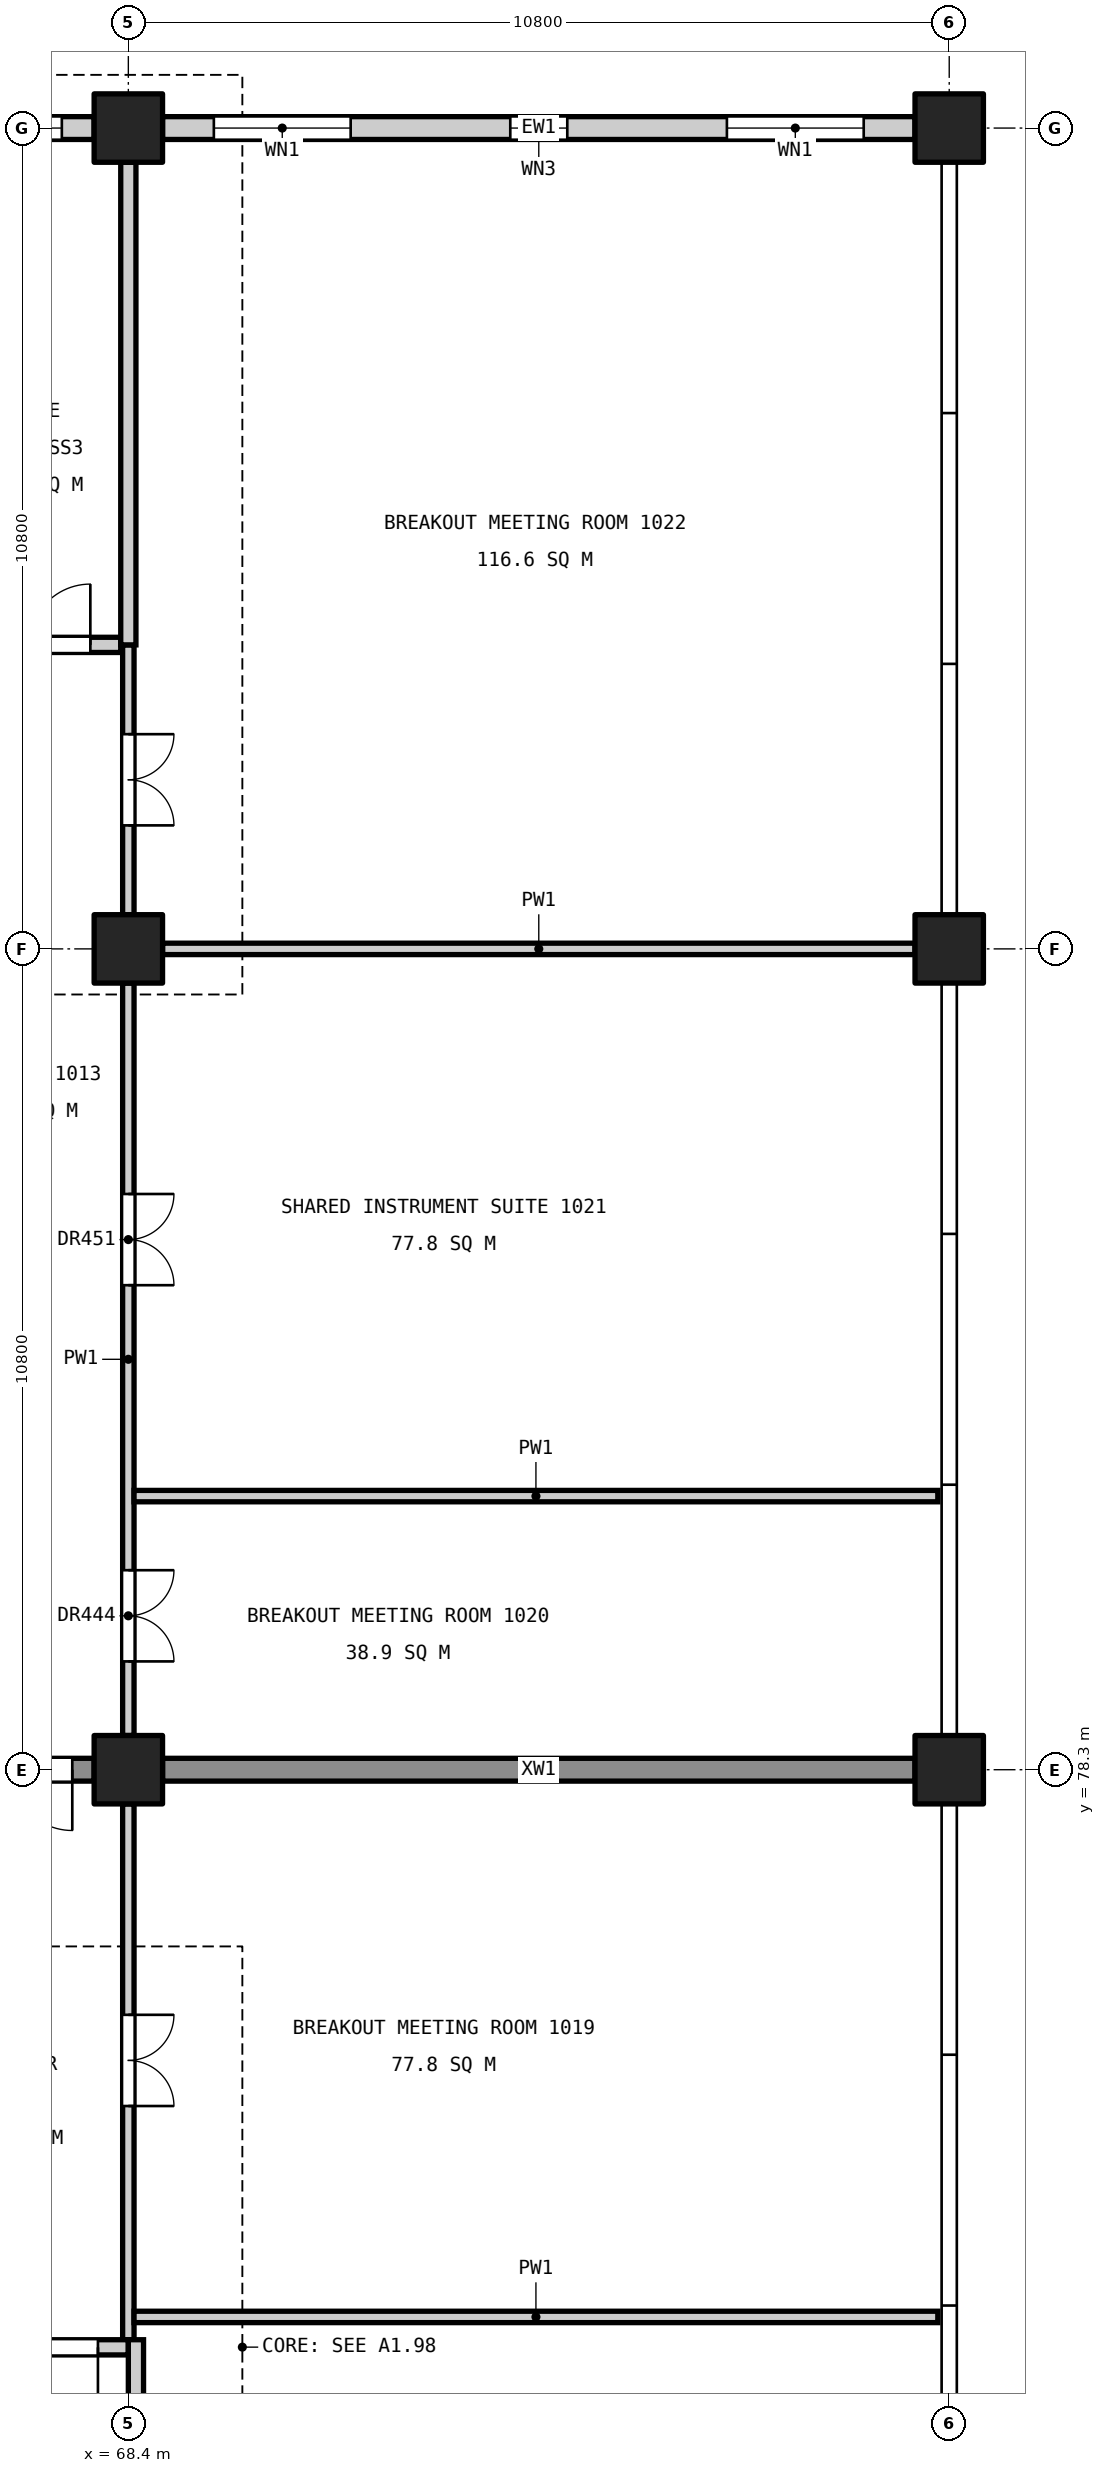
"""IFC4 building model, lengths in metres.
Left out: names, types, materials, properties, quantities, classifications, styles, units other than length and angle.
Written with IfcOpenShell. Run it as: python <this file> out.ifc"""

import sys

from ifc_helpers import new_model, si_unit, direction, frame, frame_2d, origin, origin_2d, place, context, subcontext, project, spatial, rectangle, extrude, element, fill, save


model = new_model("IFC4")
c1 = context("Model", 3, precision=1e-05, world=origin(), true_north=direction((0.0, 1.0)))
c2 = subcontext(c1, "Body", "Model", "MODEL_VIEW")
j1 = project(units=[si_unit("LENGTHUNIT", "METRE"), si_unit("PLANEANGLEUNIT", "RADIAN")], contexts=[c1])
p1 = place(None, origin())
s1 = spatial("IfcSite", under=j1, at=p1, CompositionType="ELEMENT")
p2 = place(p1, origin())
s2 = spatial("IfcBuilding", under=s1, at=p2, CompositionType="ELEMENT")
p3 = place(p2, frame((0.0, 0.0, 51.0)))
s3 = spatial("IfcBuildingStorey", under=s2, at=p3, CompositionType="ELEMENT", Elevation=51.0)
for number, where, z_axis, x_axis in (
    (1, (68.4, 78.3, 0.0), (0.0, 0.0, 1.0), (1.0, 0.0, 0.0)),
    (2, (68.4, 89.1, 0.0), (0.0, 0.0, 1.0), (1.0, 0.0, 0.0)),
    (3, (68.4, 99.9, 0.0), (0.0, 0.0, 1.0), (1.0, 0.0, 0.0)),
    (4, (79.2, 78.3, 0.0), (0.0, 0.0, 1.0), (1.0, 0.0, 0.0)),
    (5, (79.2, 89.1, 0.0), (0.0, 0.0, 1.0), (1.0, 0.0, 0.0)),
    (6, (79.2, 99.9, 0.0), (0.0, 0.0, 1.0), (1.0, 0.0, 0.0)),
):
    element("IfcColumn", number, at=place(p3, frame(where, z_axis=z_axis, x_axis=x_axis)), inside=s3, PredefinedType="COLUMN", context=c2, shape_type="SweptSolid", body=[
        extrude(rectangle(XDim=0.9, YDim=0.9, at=origin_2d()), origin(), (0.0, 0.0, 1.0), 4.8),
    ])
p4 = place(p3, frame((61.65, 78.3, 0.0), z_axis=(0.0, 0.0, 1.0), x_axis=(1.0, 0.0, 0.0)))
e7 = element("IfcWall", 7, at=p4, inside=s3, PredefinedType="SHEAR", context=c2, shape_type="SweptSolid", body=[
    extrude(rectangle(XDim=6.3, YDim=0.3, at=frame_2d((3.15, 0.0))), origin(), (0.0, 0.0, 1.0), 4.55),
])
p5 = place(p4, frame((4.413, 0.0, 0.0)))
e8 = element("IfcOpeningElement", 8, at=p5, cuts=e7, PredefinedType="OPENING", context=c2, shape_type="SweptSolid", body=[
    extrude(rectangle(XDim=1.6, YDim=2.1, at=frame_2d((0.8, 1.05))), frame((0.0, 0.16, 0.0), z_axis=(0.0, -1.0, 0.0), x_axis=(1.0, 0.0, 0.0)), (0.0, 0.0, 1.0), 0.32),
])
p6 = place(p3, frame((68.85, 78.3, 0.0), z_axis=(0.0, 0.0, 1.0), x_axis=(1.0, 0.0, 0.0)))
e9 = element("IfcWall", 9, at=p6, inside=s3, PredefinedType="SHEAR", context=c2, shape_type="SweptSolid", body=[
    extrude(rectangle(XDim=9.9, YDim=0.3, at=frame_2d((4.95, 0.0))), origin(), (0.0, 0.0, 1.0), 4.55),
])
p7 = place(p3, frame((65.9, 99.9, 0.0), z_axis=(0.0, 0.0, 1.0), x_axis=(1.0, 0.0, 0.0)))
e10 = element("IfcWall", 10, at=p7, inside=s3, PredefinedType="STANDARD", context=c2, shape_type="SweptSolid", body=[
    extrude(rectangle(XDim=2.05, YDim=0.3, at=frame_2d((1.025, 0.0))), origin(), (0.0, 0.0, 1.0), 3.85),
])
p8 = place(p7, frame((0.425, 0.0, 0.9)))
e11 = element("IfcOpeningElement", 11, at=p8, cuts=e10, PredefinedType="OPENING", context=c2, shape_type="SweptSolid", body=[
    extrude(rectangle(XDim=1.2, YDim=2.4, at=frame_2d((0.6, 1.2))), frame((0.0, 0.16, 0.0), z_axis=(0.0, -1.0, 0.0), x_axis=(1.0, 0.0, 0.0)), (0.0, 0.0, 1.0), 0.32),
])
p9 = place(p3, frame((68.85, 99.9, 0.0), z_axis=(0.0, 0.0, 1.0), x_axis=(1.0, 0.0, 0.0)))
e12 = element("IfcWall", 12, at=p9, inside=s3, PredefinedType="STANDARD", context=c2, shape_type="SweptSolid", body=[
    extrude(rectangle(XDim=9.9, YDim=0.3, at=frame_2d((4.95, 0.0))), origin(), (0.0, 0.0, 1.0), 3.85),
])
p10 = place(p9, frame((0.675, 0.0, 0.9)))
e13 = element("IfcOpeningElement", 13, at=p10, cuts=e12, PredefinedType="OPENING", context=c2, shape_type="SweptSolid", body=[
    extrude(rectangle(XDim=1.8, YDim=2.4, at=frame_2d((0.9, 1.2))), frame((0.0, 0.16, 0.0), z_axis=(0.0, -1.0, 0.0), x_axis=(1.0, 0.0, 0.0)), (0.0, 0.0, 1.0), 0.32),
])
p11 = place(p9, frame((4.575, 0.0, 0.8)))
e14 = element("IfcOpeningElement", 14, at=p11, cuts=e12, PredefinedType="OPENING", context=c2, shape_type="SweptSolid", body=[
    extrude(rectangle(XDim=0.75, YDim=1.2, at=frame_2d((0.375, 0.6))), frame((0.0, 0.16, 0.0), z_axis=(0.0, -1.0, 0.0), x_axis=(1.0, 0.0, 0.0)), (0.0, 0.0, 1.0), 0.32),
])
p12 = place(p9, frame((7.425, 0.0, 0.9)))
e15 = element("IfcOpeningElement", 15, at=p12, cuts=e12, PredefinedType="OPENING", context=c2, shape_type="SweptSolid", body=[
    extrude(rectangle(XDim=1.8, YDim=2.4, at=frame_2d((0.9, 1.2))), frame((0.0, 0.16, 0.0), z_axis=(0.0, -1.0, 0.0), x_axis=(1.0, 0.0, 0.0)), (0.0, 0.0, 1.0), 0.32),
])
p13 = place(p3, frame((65.9, 93.1, 0.0), z_axis=(0.0, 0.0, 1.0), x_axis=(1.0, 0.0, 0.0)))
e16 = element("IfcWall", 16, at=p13, inside=s3, PredefinedType="PARTITIONING", context=c2, shape_type="SweptSolid", body=[
    extrude(rectangle(XDim=2.4, YDim=0.2, at=frame_2d((1.2, 0.0))), origin(), (0.0, 0.0, 1.0), 3.55),
])
p14 = place(p13, frame((0.4, 0.0, 0.0)))
e17 = element("IfcOpeningElement", 17, at=p14, cuts=e16, PredefinedType="OPENING", context=c2, shape_type="SweptSolid", body=[
    extrude(rectangle(XDim=1.6, YDim=2.1, at=frame_2d((0.8, 1.05))), frame((0.0, 0.11, 0.0), z_axis=(0.0, -1.0, 0.0), x_axis=(1.0, 0.0, 0.0)), (0.0, 0.0, 1.0), 0.22),
])
p15 = place(p3, frame((68.4, 70.8, 0.0), z_axis=(0.0, 0.0, 1.0), x_axis=(0.0, 1.0, 0.0)))
e18 = element("IfcWall", 18, at=p15, inside=s3, PredefinedType="PARTITIONING", context=c2, shape_type="SweptSolid", body=[
    extrude(rectangle(XDim=7.05, YDim=0.15, at=frame_2d((3.525, 0.0))), origin(), (0.0, 0.0, 1.0), 3.55),
])
p16 = place(p15, frame((3.075, 0.0, 0.0)))
e19 = element("IfcOpeningElement", 19, at=p16, cuts=e18, PredefinedType="OPENING", context=c2, shape_type="SweptSolid", body=[
    extrude(rectangle(XDim=1.2, YDim=2.1, at=frame_2d((0.6, 1.05))), frame((0.0, 0.085, 0.0), z_axis=(0.0, -1.0, 0.0), x_axis=(1.0, 0.0, 0.0)), (0.0, 0.0, 1.0), 0.17),
])
p17 = place(p3, frame((68.4, 78.75, 0.0), z_axis=(0.0, 0.0, 1.0), x_axis=(0.0, 1.0, 0.0)))
e20 = element("IfcWall", 20, at=p17, inside=s3, PredefinedType="PARTITIONING", context=c2, shape_type="SweptSolid", body=[
    extrude(rectangle(XDim=9.9, YDim=0.15, at=frame_2d((4.95, 0.0))), origin(), (0.0, 0.0, 1.0), 3.55),
])
p18 = place(p17, frame((0.975, 0.0, 0.0)))
e21 = element("IfcOpeningElement", 21, at=p18, cuts=e20, PredefinedType="OPENING", context=c2, shape_type="SweptSolid", body=[
    extrude(rectangle(XDim=1.2, YDim=2.1, at=frame_2d((0.6, 1.05))), frame((0.0, 0.085, 0.0), z_axis=(0.0, -1.0, 0.0), x_axis=(1.0, 0.0, 0.0)), (0.0, 0.0, 1.0), 0.17),
])
p19 = place(p17, frame((5.925, 0.0, 0.0)))
e22 = element("IfcOpeningElement", 22, at=p19, cuts=e20, PredefinedType="OPENING", context=c2, shape_type="SweptSolid", body=[
    extrude(rectangle(XDim=1.2, YDim=2.1, at=frame_2d((0.6, 1.05))), frame((0.0, 0.085, 0.0), z_axis=(0.0, -1.0, 0.0), x_axis=(1.0, 0.0, 0.0)), (0.0, 0.0, 1.0), 0.17),
])
p20 = place(p3, frame((68.4, 89.55, 0.0), z_axis=(0.0, 0.0, 1.0), x_axis=(0.0, 1.0, 0.0)))
e23 = element("IfcWall", 23, at=p20, inside=s3, PredefinedType="PARTITIONING", context=c2, shape_type="SweptSolid", body=[
    extrude(rectangle(XDim=3.55, YDim=0.15, at=frame_2d((1.775, 0.0))), origin(), (0.0, 0.0, 1.0), 3.55),
])
p21 = place(p20, frame((1.175, 0.0, 0.0)))
e24 = element("IfcOpeningElement", 24, at=p21, cuts=e23, PredefinedType="OPENING", context=c2, shape_type="SweptSolid", body=[
    extrude(rectangle(XDim=1.2, YDim=2.1, at=frame_2d((0.6, 1.05))), frame((0.0, 0.085, 0.0), z_axis=(0.0, -1.0, 0.0), x_axis=(1.0, 0.0, 0.0)), (0.0, 0.0, 1.0), 0.17),
])
p22 = place(p3, frame((68.4, 93.1, 0.0), z_axis=(0.0, 0.0, 1.0), x_axis=(0.0, 1.0, 0.0)))
e25 = element("IfcWall", 25, at=p22, inside=s3, PredefinedType="PARTITIONING", context=c2, shape_type="SweptSolid", body=[
    extrude(rectangle(XDim=6.35, YDim=0.2, at=frame_2d((3.175, 0.0))), origin(), (0.0, 0.0, 1.0), 3.55),
])
p23 = place(p3, frame((65.9, 70.7, 0.0), z_axis=(0.0, 0.0, 1.0), x_axis=(1.0, 0.0, 0.0)))
e26 = element("IfcWall", 26, at=p23, inside=s3, PredefinedType="PARTITIONING", context=c2, shape_type="SweptSolid", body=[
    extrude(rectangle(XDim=2.5, YDim=0.2, at=frame_2d((1.25, 0.0))), origin(), (0.0, 0.0, 1.0), 3.55),
])
p24 = place(p23, frame((0.9, 0.0, 0.0)))
e27 = element("IfcOpeningElement", 27, at=p24, cuts=e26, PredefinedType="OPENING", context=c2, shape_type="SweptSolid", body=[
    extrude(rectangle(XDim=1.2, YDim=2.1, at=frame_2d((0.6, 1.05))), frame((0.0, 0.11, 0.0), z_axis=(0.0, -1.0, 0.0), x_axis=(1.0, 0.0, 0.0)), (0.0, 0.0, 1.0), 0.22),
])
p25 = place(p3, frame((68.5, 67.95, 0.0), z_axis=(0.0, 0.0, 1.0), x_axis=(0.0, 1.0, 0.0)))
e28 = element("IfcWall", 28, at=p25, inside=s3, PredefinedType="PARTITIONING", context=c2, shape_type="SweptSolid", body=[
    extrude(rectangle(XDim=2.85, YDim=0.2, at=frame_2d((1.425, 0.0))), origin(), (0.0, 0.0, 1.0), 3.55),
])
for number, where, z_axis, x_axis in (
    (29, (68.475, 71.1, 0.0), (0.0, 0.0, 1.0), (1.0, 0.0, 0.0)),
    (30, (68.475, 81.9, 0.0), (0.0, 0.0, 1.0), (1.0, 0.0, 0.0)),
):
    element("IfcWall", number, at=place(p3, frame(where, z_axis=z_axis, x_axis=x_axis)), inside=s3, PredefinedType="PARTITIONING", context=c2, shape_type="SweptSolid", body=[
        extrude(rectangle(XDim=10.575, YDim=0.15, at=frame_2d((5.288, 0.0))), origin(), (0.0, 0.0, 1.0), 3.85),
    ])
p26 = place(p3, frame((68.85, 89.1, 0.0), z_axis=(0.0, 0.0, 1.0), x_axis=(1.0, 0.0, 0.0)))
e31 = element("IfcWall", 31, at=p26, inside=s3, PredefinedType="PARTITIONING", context=c2, shape_type="SweptSolid", body=[
    extrude(rectangle(XDim=9.9, YDim=0.15, at=frame_2d((4.95, 0.0))), origin(), (0.0, 0.0, 1.0), 3.85),
])
p27 = place(p8, origin())
e32 = element("IfcWindow", 32, at=p27, inside=s3, PartitioningType="SINGLE_PANEL", PredefinedType="WINDOW", context=c2, shape_type="SweptSolid", body=[
    extrude(rectangle(XDim=1.2, YDim=2.4, at=frame_2d((0.6, 1.2))), frame((0.0, 0.03, 0.0), z_axis=(0.0, -1.0, 0.0), x_axis=(1.0, 0.0, 0.0)), (0.0, 0.0, 1.0), 0.06),
])
fill(e11, e32)
p28 = place(p10, origin())
e33 = element("IfcWindow", 33, at=p28, inside=s3, PartitioningType="SINGLE_PANEL", PredefinedType="WINDOW", context=c2, shape_type="SweptSolid", body=[
    extrude(rectangle(XDim=1.8, YDim=2.4, at=frame_2d((0.9, 1.2))), frame((0.0, 0.03, 0.0), z_axis=(0.0, -1.0, 0.0), x_axis=(1.0, 0.0, 0.0)), (0.0, 0.0, 1.0), 0.06),
])
fill(e13, e33)
p29 = place(p11, origin())
e34 = element("IfcWindow", 34, at=p29, inside=s3, PartitioningType="SINGLE_PANEL", PredefinedType="WINDOW", context=c2, shape_type="SweptSolid", body=[
    extrude(rectangle(XDim=0.75, YDim=1.2, at=frame_2d((0.375, 0.6))), frame((0.0, 0.03, 0.0), z_axis=(0.0, -1.0, 0.0), x_axis=(1.0, 0.0, 0.0)), (0.0, 0.0, 1.0), 0.06),
])
fill(e14, e34)
p30 = place(p12, origin())
e35 = element("IfcWindow", 35, at=p30, inside=s3, PartitioningType="SINGLE_PANEL", PredefinedType="WINDOW", context=c2, shape_type="SweptSolid", body=[
    extrude(rectangle(XDim=1.8, YDim=2.4, at=frame_2d((0.9, 1.2))), frame((0.0, 0.03, 0.0), z_axis=(0.0, -1.0, 0.0), x_axis=(1.0, 0.0, 0.0)), (0.0, 0.0, 1.0), 0.06),
])
fill(e15, e35)
p31 = place(p16, frame((1.2, 0.0, 0.0), z_axis=(0.0, 0.0, 1.0), x_axis=(-1.0, 0.0, 0.0)))
e36 = element("IfcDoor", 36, at=p31, inside=s3, OperationType="DOUBLE_DOOR_SINGLE_SWING", PredefinedType="DOOR", context=c2, shape_type="SweptSolid", body=[
    extrude(rectangle(XDim=1.2, YDim=2.1, at=frame_2d((0.6, 1.05))), frame((0.0, 0.025, 0.0), z_axis=(0.0, -1.0, 0.0), x_axis=(1.0, 0.0, 0.0)), (0.0, 0.0, 1.0), 0.05),
])
fill(e19, e36)
p32 = place(p18, frame((1.2, 0.0, 0.0), z_axis=(0.0, 0.0, 1.0), x_axis=(-1.0, 0.0, 0.0)))
e37 = element("IfcDoor", 37, at=p32, inside=s3, OperationType="DOUBLE_DOOR_SINGLE_SWING", PredefinedType="DOOR", context=c2, shape_type="SweptSolid", body=[
    extrude(rectangle(XDim=1.2, YDim=2.1, at=frame_2d((0.6, 1.05))), frame((0.0, 0.025, 0.0), z_axis=(0.0, -1.0, 0.0), x_axis=(1.0, 0.0, 0.0)), (0.0, 0.0, 1.0), 0.05),
])
fill(e21, e37)
p33 = place(p21, frame((1.2, 0.0, 0.0), z_axis=(0.0, 0.0, 1.0), x_axis=(-1.0, 0.0, 0.0)))
e38 = element("IfcDoor", 38, at=p33, inside=s3, OperationType="DOUBLE_DOOR_SINGLE_SWING", PredefinedType="DOOR", context=c2, shape_type="SweptSolid", body=[
    extrude(rectangle(XDim=1.2, YDim=2.1, at=frame_2d((0.6, 1.05))), frame((0.0, 0.025, 0.0), z_axis=(0.0, -1.0, 0.0), x_axis=(1.0, 0.0, 0.0)), (0.0, 0.0, 1.0), 0.05),
])
fill(e24, e38)
p34 = place(p19, frame((1.2, 0.0, 0.0), z_axis=(0.0, 0.0, 1.0), x_axis=(-1.0, 0.0, 0.0)))
e39 = element("IfcDoor", 39, at=p34, inside=s3, OperationType="DOUBLE_DOOR_SINGLE_SWING", PredefinedType="DOOR", context=c2, shape_type="SweptSolid", body=[
    extrude(rectangle(XDim=1.2, YDim=2.1, at=frame_2d((0.6, 1.05))), frame((0.0, 0.025, 0.0), z_axis=(0.0, -1.0, 0.0), x_axis=(1.0, 0.0, 0.0)), (0.0, 0.0, 1.0), 0.05),
])
fill(e22, e39)
p35 = place(p24, frame((1.2, 0.0, 0.0), z_axis=(0.0, 0.0, 1.0), x_axis=(-1.0, 0.0, 0.0)))
e40 = element("IfcDoor", 40, at=p35, inside=s3, OperationType="SINGLE_SWING_LEFT", PredefinedType="DOOR", context=c2, shape_type="SweptSolid", body=[
    extrude(rectangle(XDim=1.2, YDim=2.1, at=frame_2d((0.6, 1.05))), frame((0.0, 0.025, 0.0), z_axis=(0.0, -1.0, 0.0), x_axis=(1.0, 0.0, 0.0)), (0.0, 0.0, 1.0), 0.05),
])
fill(e27, e40)
p36 = place(p14, origin())
e41 = element("IfcDoor", 41, at=p36, inside=s3, OperationType="DOUBLE_DOOR_SINGLE_SWING", PredefinedType="DOOR", context=c2, shape_type="SweptSolid", body=[
    extrude(rectangle(XDim=1.6, YDim=2.1, at=frame_2d((0.8, 1.05))), frame((0.0, 0.025, 0.0), z_axis=(0.0, -1.0, 0.0), x_axis=(1.0, 0.0, 0.0)), (0.0, 0.0, 1.0), 0.05),
])
fill(e17, e41)
p37 = place(p5, frame((1.6, 0.0, 0.0), z_axis=(0.0, 0.0, 1.0), x_axis=(-1.0, 0.0, 0.0)))
e42 = element("IfcDoor", 42, at=p37, inside=s3, OperationType="DOUBLE_DOOR_SINGLE_SWING", PredefinedType="DOOR", context=c2, shape_type="SweptSolid", body=[
    extrude(rectangle(XDim=1.6, YDim=2.1, at=frame_2d((0.8, 1.05))), frame((0.0, 0.025, 0.0), z_axis=(0.0, -1.0, 0.0), x_axis=(1.0, 0.0, 0.0)), (0.0, 0.0, 1.0), 0.05),
])
fill(e8, e42)
save(model, sys.argv[1])
